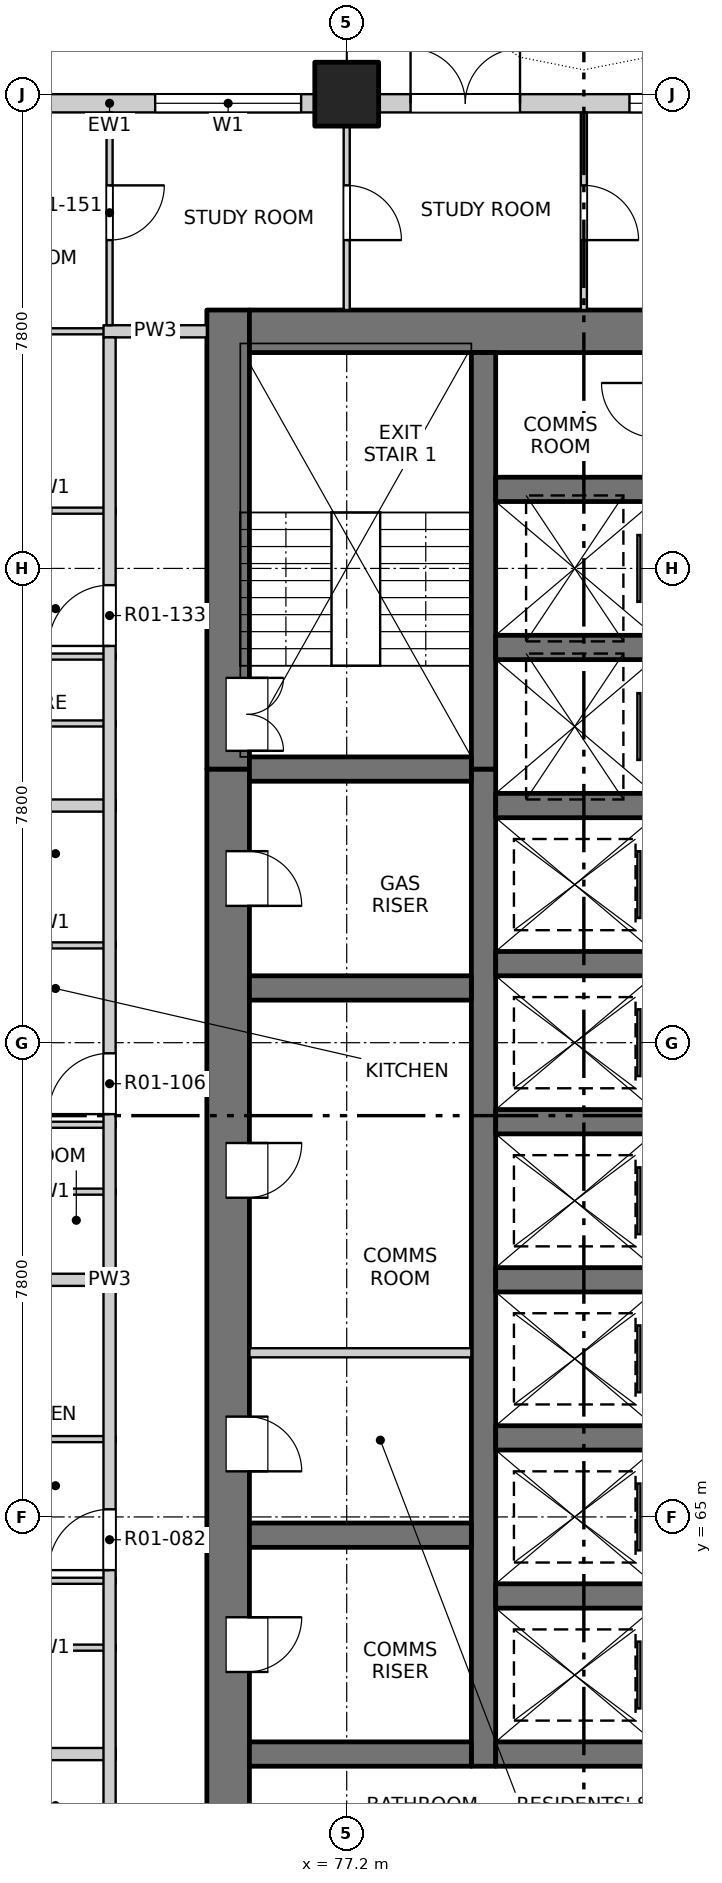
"""IFC4 building model, lengths in metres.
Left out: names, types, materials, properties, quantities, classifications, styles, units other than length and angle.
Written with IfcOpenShell. Run it as: python <this file> out.ifc"""

import sys

from ifc_helpers import new_model, si_unit, direction, frame, frame_2d, origin, origin_2d, place, context, subcontext, project, spatial, rectangle, extrude, element, fill, save


model = new_model("IFC4")
c1 = context("Model", 3, precision=1e-05, world=origin(), true_north=direction((0.0, 1.0)))
c2 = subcontext(c1, "Body", "Model", "MODEL_VIEW")
j1 = project(units=[si_unit("LENGTHUNIT", "METRE"), si_unit("PLANEANGLEUNIT", "RADIAN")], contexts=[c1])
p1 = place(None, origin())
s1 = spatial("IfcSite", under=j1, at=p1, CompositionType="ELEMENT")
p2 = place(p1, origin())
s2 = spatial("IfcBuilding", under=s1, at=p2, CompositionType="ELEMENT")
p3 = place(p2, frame((0.0, 0.0, 26.3)))
s3 = spatial("IfcBuildingStorey", under=s2, at=p3, CompositionType="ELEMENT", Elevation=26.3)
p4 = place(p3, frame((77.2, 88.4, -0.25), z_axis=(0.0, 0.0, 1.0), x_axis=(1.0, 0.0, 0.0)))
e1 = element("IfcColumn", 1, at=p4, inside=s3, PredefinedType="COLUMN", context=c2, shape_type="SweptSolid", body=[
    extrude(rectangle(XDim=1.05, YDim=1.05, at=origin_2d()), origin(), (0.0, 0.0, 1.0), 3.4),
])
p5 = place(p3, frame((75.25, 54.9, -0.25), z_axis=(0.0, 0.0, 1.0), x_axis=(0.0, 1.0, 0.0)))
e2 = element("IfcWall", 2, at=p5, inside=s3, PredefinedType="SOLIDWALL", context=c2, shape_type="SweptSolid", body=[
    extrude(rectangle(XDim=22.4, YDim=0.7, at=frame_2d((11.2, 0.0))), origin(), (0.0, 0.0, 1.0), 3.4),
])
p6 = place(p5, frame((7.55, 0.0, 0.25)))
e3 = element("IfcOpeningElement", 3, at=p6, cuts=e2, PredefinedType="OPENING", context=c2, shape_type="SweptSolid", body=[
    extrude(rectangle(XDim=0.9, YDim=2.1, at=frame_2d((0.45, 1.05))), frame((0.0, 0.36, 0.0), z_axis=(0.0, -1.0, 0.0), x_axis=(1.0, 0.0, 0.0)), (0.0, 0.0, 1.0), 0.72),
])
p7 = place(p5, frame((10.85, 0.0, 0.25)))
e4 = element("IfcOpeningElement", 4, at=p7, cuts=e2, PredefinedType="OPENING", context=c2, shape_type="SweptSolid", body=[
    extrude(rectangle(XDim=0.9, YDim=2.1, at=frame_2d((0.45, 1.05))), frame((0.0, 0.36, 0.0), z_axis=(0.0, -1.0, 0.0), x_axis=(1.0, 0.0, 0.0)), (0.0, 0.0, 1.0), 0.72),
])
p8 = place(p5, frame((15.35, 0.0, 0.25)))
e5 = element("IfcOpeningElement", 5, at=p8, cuts=e2, PredefinedType="OPENING", context=c2, shape_type="SweptSolid", body=[
    extrude(rectangle(XDim=0.9, YDim=2.1, at=frame_2d((0.45, 1.05))), frame((0.0, 0.36, 0.0), z_axis=(0.0, -1.0, 0.0), x_axis=(1.0, 0.0, 0.0)), (0.0, 0.0, 1.0), 0.72),
])
p9 = place(p5, frame((20.15, 0.0, 0.25)))
e6 = element("IfcOpeningElement", 6, at=p9, cuts=e2, PredefinedType="OPENING", context=c2, shape_type="SweptSolid", body=[
    extrude(rectangle(XDim=0.9, YDim=2.1, at=frame_2d((0.45, 1.05))), frame((0.0, 0.36, 0.0), z_axis=(0.0, -1.0, 0.0), x_axis=(1.0, 0.0, 0.0)), (0.0, 0.0, 1.0), 0.72),
])
p10 = place(p3, frame((75.25, 77.3, -0.25), z_axis=(0.0, 0.0, 1.0), x_axis=(0.0, 1.0, 0.0)))
e7 = element("IfcWall", 7, at=p10, inside=s3, PredefinedType="SOLIDWALL", context=c2, shape_type="SweptSolid", body=[
    extrude(rectangle(XDim=7.55, YDim=0.7, at=frame_2d((3.775, 0.0))), origin(), (0.0, 0.0, 1.0), 3.4),
])
p11 = place(p10, frame((0.3, 0.0, 0.25)))
e8 = element("IfcOpeningElement", 8, at=p11, cuts=e7, PredefinedType="OPENING", context=c2, shape_type="SweptSolid", body=[
    extrude(rectangle(XDim=1.2, YDim=2.1, at=frame_2d((0.6, 1.05))), frame((0.0, 0.36, 0.0), z_axis=(0.0, -1.0, 0.0), x_axis=(1.0, 0.0, 0.0)), (0.0, 0.0, 1.0), 0.72),
])
p12 = place(p3, frame((75.6, 84.5, -0.25), z_axis=(0.0, 0.0, 1.0), x_axis=(1.0, 0.0, 0.0)))
e9 = element("IfcWall", 9, at=p12, inside=s3, PredefinedType="SOLIDWALL", context=c2, shape_type="SweptSolid", body=[
    extrude(rectangle(XDim=18.8, YDim=0.7, at=frame_2d((9.4, 0.0))), origin(), (0.0, 0.0, 1.0), 3.4),
])
p13 = place(p3, frame((79.45, 60.9, -0.25), z_axis=(0.0, 0.0, 1.0), x_axis=(0.0, 1.0, 0.0)))
e10 = element("IfcWall", 10, at=p13, inside=s3, PredefinedType="SOLIDWALL", context=c2, shape_type="SweptSolid", body=[
    extrude(rectangle(XDim=16.4, YDim=0.4, at=frame_2d((8.2, 0.0))), origin(), (0.0, 0.0, 1.0), 3.4),
])
p14 = place(p3, frame((79.45, 77.3, -0.25), z_axis=(0.0, 0.0, 1.0), x_axis=(0.0, 1.0, 0.0)))
e11 = element("IfcWall", 11, at=p14, inside=s3, PredefinedType="SOLIDWALL", context=c2, shape_type="SweptSolid", body=[
    extrude(rectangle(XDim=6.85, YDim=0.4, at=frame_2d((3.425, 0.0))), origin(), (0.0, 0.0, 1.0), 3.4),
])
for number, where, z_axis, x_axis in (
    (12, (79.65, 61.1, -0.25), (0.0, 0.0, 1.0), (1.0, 0.0, 0.0)),
    (13, (79.65, 63.7, -0.25), (0.0, 0.0, 1.0), (1.0, 0.0, 0.0)),
    (14, (79.65, 66.3, -0.25), (0.0, 0.0, 1.0), (1.0, 0.0, 0.0)),
    (15, (79.65, 68.9, -0.25), (0.0, 0.0, 1.0), (1.0, 0.0, 0.0)),
    (16, (79.65, 71.5, -0.25), (0.0, 0.0, 1.0), (1.0, 0.0, 0.0)),
    (17, (79.65, 74.1, -0.25), (0.0, 0.0, 1.0), (1.0, 0.0, 0.0)),
    (18, (79.65, 76.7, -0.25), (0.0, 0.0, 1.0), (1.0, 0.0, 0.0)),
    (19, (79.65, 79.3, -0.25), (0.0, 0.0, 1.0), (1.0, 0.0, 0.0)),
    (20, (79.65, 81.9, -0.25), (0.0, 0.0, 1.0), (1.0, 0.0, 0.0)),
):
    element("IfcWall", number, at=place(p3, frame(where, z_axis=z_axis, x_axis=x_axis)), inside=s3, PredefinedType="SOLIDWALL", context=c2, shape_type="SweptSolid", body=[
        extrude(rectangle(XDim=3.0, YDim=0.4, at=frame_2d((1.5, 0.0))), origin(), (0.0, 0.0, 1.0), 3.4),
    ])
for number, where, z_axis, x_axis in (
    (21, (75.6, 61.1, -0.25), (0.0, 0.0, 1.0), (1.0, 0.0, 0.0)),
    (22, (75.6, 64.7, -0.25), (0.0, 0.0, 1.0), (1.0, 0.0, 0.0)),
    (23, (75.6, 73.7, -0.25), (0.0, 0.0, 1.0), (1.0, 0.0, 0.0)),
    (24, (75.6, 77.3, -0.25), (0.0, 0.0, 1.0), (1.0, 0.0, 0.0)),
):
    element("IfcWall", number, at=place(p3, frame(where, z_axis=z_axis, x_axis=x_axis)), inside=s3, PredefinedType="SOLIDWALL", context=c2, shape_type="SweptSolid", body=[
        extrude(rectangle(XDim=3.65, YDim=0.4, at=frame_2d((1.825, 0.0))), origin(), (0.0, 0.0, 1.0), 3.4),
    ])
p15 = place(p3, frame((69.925, 88.25, 0.0), z_axis=(0.0, 0.0, 1.0), x_axis=(1.0, 0.0, 0.0)))
e25 = element("IfcWall", 25, at=p15, inside=s3, PredefinedType="SOLIDWALL", context=c2, shape_type="SweptSolid", body=[
    extrude(rectangle(XDim=6.75, YDim=0.3, at=frame_2d((3.375, 0.0))), origin(), (0.0, 0.0, 1.0), 2.7),
])
p16 = place(p15, frame((0.525, 0.0, 0.0)))
e26 = element("IfcOpeningElement", 26, at=p16, cuts=e25, PredefinedType="OPENING", context=c2, shape_type="SweptSolid", body=[
    extrude(rectangle(XDim=1.8, YDim=2.4, at=frame_2d((0.9, 1.2))), frame((0.0, 0.16, 0.0), z_axis=(0.0, -1.0, 0.0), x_axis=(1.0, 0.0, 0.0)), (0.0, 0.0, 1.0), 0.32),
])
p17 = place(p15, frame((4.125, 0.0, 0.9)))
e27 = element("IfcOpeningElement", 27, at=p17, cuts=e25, PredefinedType="OPENING", context=c2, shape_type="SweptSolid", body=[
    extrude(rectangle(XDim=2.4, YDim=1.8, at=frame_2d((1.2, 0.9))), frame((0.0, 0.16, 0.0), z_axis=(0.0, -1.0, 0.0), x_axis=(1.0, 0.0, 0.0)), (0.0, 0.0, 1.0), 0.32),
])
p18 = place(p3, frame((77.725, 88.25, 0.0), z_axis=(0.0, 0.0, 1.0), x_axis=(1.0, 0.0, 0.0)))
e28 = element("IfcWall", 28, at=p18, inside=s3, PredefinedType="SOLIDWALL", context=c2, shape_type="SweptSolid", body=[
    extrude(rectangle(XDim=6.75, YDim=0.3, at=frame_2d((3.375, 0.0))), origin(), (0.0, 0.0, 1.0), 2.7),
])
p19 = place(p18, frame((0.525, 0.0, 0.0)))
e29 = element("IfcOpeningElement", 29, at=p19, cuts=e28, PredefinedType="OPENING", context=c2, shape_type="SweptSolid", body=[
    extrude(rectangle(XDim=1.8, YDim=2.4, at=frame_2d((0.9, 1.2))), frame((0.0, 0.16, 0.0), z_axis=(0.0, -1.0, 0.0), x_axis=(1.0, 0.0, 0.0)), (0.0, 0.0, 1.0), 0.32),
])
p20 = place(p18, frame((4.125, 0.0, 0.9)))
e30 = element("IfcOpeningElement", 30, at=p20, cuts=e28, PredefinedType="OPENING", context=c2, shape_type="SweptSolid", body=[
    extrude(rectangle(XDim=2.4, YDim=1.8, at=frame_2d((1.2, 0.9))), frame((0.0, 0.16, 0.0), z_axis=(0.0, -1.0, 0.0), x_axis=(1.0, 0.0, 0.0)), (0.0, 0.0, 1.0), 0.32),
])
p21 = place(p3, frame((61.9, 61.1, 0.0), z_axis=(0.0, 0.0, 1.0), x_axis=(1.0, 0.0, 0.0)))
e31 = element("IfcWall", 31, at=p21, inside=s3, PredefinedType="PARTITIONING", context=c2, shape_type="SweptSolid", body=[
    extrude(rectangle(XDim=11.5, YDim=0.2, at=frame_2d((5.75, 0.0))), origin(), (0.0, 0.0, 1.0), 3.15),
])
for number, where, z_axis, x_axis in (
    (32, (71.18, 62.85, 0.0), (0.0, 0.0, 1.0), (1.0, 0.0, 0.0)),
    (33, (71.18, 63.95, 0.0), (0.0, 0.0, 1.0), (1.0, 0.0, 0.0)),
    (34, (71.18, 66.28, 0.0), (0.0, 0.0, 1.0), (1.0, 0.0, 0.0)),
):
    element("IfcWall", number, at=place(p3, frame(where, z_axis=z_axis, x_axis=x_axis)), inside=s3, PredefinedType="PARTITIONING", context=c2, shape_type="SweptSolid", body=[
        extrude(rectangle(XDim=2.22, YDim=0.1, at=frame_2d((1.11, 0.0))), origin(), (0.0, 0.0, 1.0), 3.15),
    ])
p22 = place(p3, frame((75.6, 67.7, 0.0), z_axis=(0.0, 0.0, 1.0), x_axis=(1.0, 0.0, 0.0)))
e35 = element("IfcWall", 35, at=p22, inside=s3, PredefinedType="PARTITIONING", context=c2, shape_type="SweptSolid", body=[
    extrude(rectangle(XDim=3.65, YDim=0.15, at=frame_2d((1.825, 0.0))), origin(), (0.0, 0.0, 1.0), 3.15),
])
p23 = place(p3, frame((61.9, 68.9, 0.0), z_axis=(0.0, 0.0, 1.0), x_axis=(1.0, 0.0, 0.0)))
e36 = element("IfcWall", 36, at=p23, inside=s3, PredefinedType="PARTITIONING", context=c2, shape_type="SweptSolid", body=[
    extrude(rectangle(XDim=11.5, YDim=0.2, at=frame_2d((5.75, 0.0))), origin(), (0.0, 0.0, 1.0), 3.15),
])
for number, where, z_axis, x_axis in (
    (37, (71.18, 70.35, 0.0), (0.0, 0.0, 1.0), (1.0, 0.0, 0.0)),
    (38, (71.18, 71.45, 0.0), (0.0, 0.0, 1.0), (1.0, 0.0, 0.0)),
    (39, (71.18, 74.4, 0.0), (0.0, 0.0, 1.0), (1.0, 0.0, 0.0)),
):
    element("IfcWall", number, at=place(p3, frame(where, z_axis=z_axis, x_axis=x_axis)), inside=s3, PredefinedType="PARTITIONING", context=c2, shape_type="SweptSolid", body=[
        extrude(rectangle(XDim=2.22, YDim=0.1, at=frame_2d((1.11, 0.0))), origin(), (0.0, 0.0, 1.0), 3.15),
    ])
p24 = place(p3, frame((61.9, 76.7, 0.0), z_axis=(0.0, 0.0, 1.0), x_axis=(1.0, 0.0, 0.0)))
e40 = element("IfcWall", 40, at=p24, inside=s3, PredefinedType="PARTITIONING", context=c2, shape_type="SweptSolid", body=[
    extrude(rectangle(XDim=11.5, YDim=0.2, at=frame_2d((5.75, 0.0))), origin(), (0.0, 0.0, 1.0), 3.15),
])
for number, where, z_axis, x_axis in (
    (41, (71.18, 78.05, 0.0), (0.0, 0.0, 1.0), (1.0, 0.0, 0.0)),
    (42, (71.18, 79.15, 0.0), (0.0, 0.0, 1.0), (1.0, 0.0, 0.0)),
    (43, (71.18, 81.55, 0.0), (0.0, 0.0, 1.0), (1.0, 0.0, 0.0)),
):
    element("IfcWall", number, at=place(p3, frame(where, z_axis=z_axis, x_axis=x_axis)), inside=s3, PredefinedType="PARTITIONING", context=c2, shape_type="SweptSolid", body=[
        extrude(rectangle(XDim=2.22, YDim=0.1, at=frame_2d((1.11, 0.0))), origin(), (0.0, 0.0, 1.0), 3.15),
    ])
p25 = place(p3, frame((61.9, 84.5, 0.0), z_axis=(0.0, 0.0, 1.0), x_axis=(1.0, 0.0, 0.0)))
e44 = element("IfcWall", 44, at=p25, inside=s3, PredefinedType="PARTITIONING", context=c2, shape_type="SweptSolid", body=[
    extrude(rectangle(XDim=11.5, YDim=0.1, at=frame_2d((5.75, 0.0))), origin(), (0.0, 0.0, 1.0), 3.15),
])
p26 = place(p25, frame((7.965, 0.0, 0.0)))
e45 = element("IfcOpeningElement", 45, at=p26, cuts=e44, PredefinedType="OPENING", context=c2, shape_type="SweptSolid", body=[
    extrude(rectangle(XDim=0.9, YDim=2.1, at=frame_2d((0.45, 1.05))), frame((0.0, 0.06, 0.0), z_axis=(0.0, -1.0, 0.0), x_axis=(1.0, 0.0, 0.0)), (0.0, 0.0, 1.0), 0.12),
])
p27 = place(p3, frame((73.2, 84.5, 0.0), z_axis=(0.0, 0.0, 1.0), x_axis=(1.0, 0.0, 0.0)))
e46 = element("IfcWall", 46, at=p27, inside=s3, PredefinedType="PARTITIONING", context=c2, shape_type="SweptSolid", body=[
    extrude(rectangle(XDim=1.7, YDim=0.2, at=frame_2d((0.85, 0.0))), origin(), (0.0, 0.0, 1.0), 3.15),
])
p28 = place(p3, frame((73.3, 53.4, 0.0), z_axis=(0.0, 0.0, 1.0), x_axis=(0.0, 1.0, 0.0)))
e47 = element("IfcWall", 47, at=p28, inside=s3, PredefinedType="PARTITIONING", context=c2, shape_type="SweptSolid", body=[
    extrude(rectangle(XDim=31.0, YDim=0.2, at=frame_2d((15.5, 0.0))), origin(), (0.0, 0.0, 1.0), 3.15),
])
p29 = place(p28, frame((2.325, 0.0, 0.0)))
e48 = element("IfcOpeningElement", 48, at=p29, cuts=e47, PredefinedType="OPENING", context=c2, shape_type="SweptSolid", body=[
    extrude(rectangle(XDim=1.0, YDim=2.1, at=frame_2d((0.5, 1.05))), frame((0.0, 0.11, 0.0), z_axis=(0.0, -1.0, 0.0), x_axis=(1.0, 0.0, 0.0)), (0.0, 0.0, 1.0), 0.22),
])
p30 = place(p28, frame((10.725, 0.0, 0.0)))
e49 = element("IfcOpeningElement", 49, at=p30, cuts=e47, PredefinedType="OPENING", context=c2, shape_type="SweptSolid", body=[
    extrude(rectangle(XDim=1.0, YDim=2.1, at=frame_2d((0.5, 1.05))), frame((0.0, 0.11, 0.0), z_axis=(0.0, -1.0, 0.0), x_axis=(1.0, 0.0, 0.0)), (0.0, 0.0, 1.0), 0.22),
])
p31 = place(p28, frame((18.225, 0.0, 0.0)))
e50 = element("IfcOpeningElement", 50, at=p31, cuts=e47, PredefinedType="OPENING", context=c2, shape_type="SweptSolid", body=[
    extrude(rectangle(XDim=1.0, YDim=2.1, at=frame_2d((0.5, 1.05))), frame((0.0, 0.11, 0.0), z_axis=(0.0, -1.0, 0.0), x_axis=(1.0, 0.0, 0.0)), (0.0, 0.0, 1.0), 0.22),
])
p32 = place(p28, frame((25.925, 0.0, 0.0)))
e51 = element("IfcOpeningElement", 51, at=p32, cuts=e47, PredefinedType="OPENING", context=c2, shape_type="SweptSolid", body=[
    extrude(rectangle(XDim=1.0, YDim=2.1, at=frame_2d((0.5, 1.05))), frame((0.0, 0.11, 0.0), z_axis=(0.0, -1.0, 0.0), x_axis=(1.0, 0.0, 0.0)), (0.0, 0.0, 1.0), 0.22),
])
p33 = place(p3, frame((73.3, 84.6, 0.0), z_axis=(0.0, 0.0, 1.0), x_axis=(0.0, 1.0, 0.0)))
e52 = element("IfcWall", 52, at=p33, inside=s3, PredefinedType="PARTITIONING", context=c2, shape_type="SweptSolid", body=[
    extrude(rectangle(XDim=3.5, YDim=0.1, at=frame_2d((1.75, 0.0))), origin(), (0.0, 0.0, 1.0), 3.15),
])
p34 = place(p33, frame((1.4, 0.0, 0.0)))
e53 = element("IfcOpeningElement", 53, at=p34, cuts=e52, PredefinedType="OPENING", context=c2, shape_type="SweptSolid", body=[
    extrude(rectangle(XDim=0.9, YDim=2.1, at=frame_2d((0.45, 1.05))), frame((0.0, 0.06, 0.0), z_axis=(0.0, -1.0, 0.0), x_axis=(1.0, 0.0, 0.0)), (0.0, 0.0, 1.0), 0.12),
])
p35 = place(p3, frame((77.2, 84.85, 0.0), z_axis=(0.0, 0.0, 1.0), x_axis=(0.0, 1.0, 0.0)))
e54 = element("IfcWall", 54, at=p35, inside=s3, PredefinedType="PARTITIONING", context=c2, shape_type="SweptSolid", body=[
    extrude(rectangle(XDim=3.25, YDim=0.1, at=frame_2d((1.625, 0.0))), origin(), (0.0, 0.0, 1.0), 3.15),
])
p36 = place(p35, frame((1.15, 0.0, 0.0)))
e55 = element("IfcOpeningElement", 55, at=p36, cuts=e54, PredefinedType="OPENING", context=c2, shape_type="SweptSolid", body=[
    extrude(rectangle(XDim=0.9, YDim=2.1, at=frame_2d((0.45, 1.05))), frame((0.0, 0.06, 0.0), z_axis=(0.0, -1.0, 0.0), x_axis=(1.0, 0.0, 0.0)), (0.0, 0.0, 1.0), 0.12),
])
p37 = place(p3, frame((81.1, 84.85, 0.0), z_axis=(0.0, 0.0, 1.0), x_axis=(0.0, 1.0, 0.0)))
e56 = element("IfcWall", 56, at=p37, inside=s3, PredefinedType="PARTITIONING", context=c2, shape_type="SweptSolid", body=[
    extrude(rectangle(XDim=3.25, YDim=0.1, at=frame_2d((1.625, 0.0))), origin(), (0.0, 0.0, 1.0), 3.15),
])
p38 = place(p37, frame((1.15, 0.0, 0.0)))
e57 = element("IfcOpeningElement", 57, at=p38, cuts=e56, PredefinedType="OPENING", context=c2, shape_type="SweptSolid", body=[
    extrude(rectangle(XDim=0.9, YDim=2.1, at=frame_2d((0.45, 1.05))), frame((0.0, 0.06, 0.0), z_axis=(0.0, -1.0, 0.0), x_axis=(1.0, 0.0, 0.0)), (0.0, 0.0, 1.0), 0.12),
])
p39 = place(p17, origin())
e58 = element("IfcWindow", 58, at=p39, inside=s3, PartitioningType="DOUBLE_PANEL_VERTICAL", PredefinedType="WINDOW", context=c2, shape_type="SweptSolid", body=[
    extrude(rectangle(XDim=2.4, YDim=1.8, at=frame_2d((1.2, 0.9))), frame((0.0, 0.03, 0.0), z_axis=(0.0, -1.0, 0.0), x_axis=(1.0, 0.0, 0.0)), (0.0, 0.0, 1.0), 0.06),
])
fill(e27, e58)
p40 = place(p19, origin())
e59 = element("IfcDoor", 59, at=p40, inside=s3, OperationType="DOUBLE_DOOR_SINGLE_SWING", PredefinedType="DOOR", context=c2, shape_type="SweptSolid", body=[
    extrude(rectangle(XDim=1.8, YDim=2.4, at=frame_2d((0.9, 1.2))), frame((0.0, 0.025, 0.0), z_axis=(0.0, -1.0, 0.0), x_axis=(1.0, 0.0, 0.0)), (0.0, 0.0, 1.0), 0.05),
])
fill(e29, e59)
p41 = place(p20, origin())
e60 = element("IfcWindow", 60, at=p41, inside=s3, PartitioningType="DOUBLE_PANEL_VERTICAL", PredefinedType="WINDOW", context=c2, shape_type="SweptSolid", body=[
    extrude(rectangle(XDim=2.4, YDim=1.8, at=frame_2d((1.2, 0.9))), frame((0.0, 0.03, 0.0), z_axis=(0.0, -1.0, 0.0), x_axis=(1.0, 0.0, 0.0)), (0.0, 0.0, 1.0), 0.06),
])
fill(e30, e60)
p42 = place(p6, origin())
e61 = element("IfcDoor", 61, at=p42, inside=s3, OperationType="SINGLE_SWING_LEFT", PredefinedType="DOOR", context=c2, shape_type="SweptSolid", body=[
    extrude(rectangle(XDim=0.9, YDim=2.1, at=frame_2d((0.45, 1.05))), frame((0.0, -0.285, 0.0), z_axis=(0.0, -1.0, 0.0), x_axis=(1.0, 0.0, 0.0)), (0.0, 0.0, 1.0), 0.05),
])
fill(e3, e61)
p43 = place(p30, origin())
e62 = element("IfcDoor", 62, at=p43, inside=s3, OperationType="SINGLE_SWING_RIGHT", PredefinedType="DOOR", context=c2, shape_type="SweptSolid", body=[
    extrude(rectangle(XDim=1.0, YDim=2.1, at=frame_2d((0.5, 1.05))), frame((0.0, 0.025, 0.0), z_axis=(0.0, -1.0, 0.0), x_axis=(1.0, 0.0, 0.0)), (0.0, 0.0, 1.0), 0.05),
])
fill(e49, e62)
p44 = place(p7, origin())
e63 = element("IfcDoor", 63, at=p44, inside=s3, OperationType="SINGLE_SWING_RIGHT", PredefinedType="DOOR", context=c2, shape_type="SweptSolid", body=[
    extrude(rectangle(XDim=0.9, YDim=2.1, at=frame_2d((0.45, 1.05))), frame((0.0, -0.285, 0.0), z_axis=(0.0, -1.0, 0.0), x_axis=(1.0, 0.0, 0.0)), (0.0, 0.0, 1.0), 0.05),
])
fill(e4, e63)
p45 = place(p8, origin())
e64 = element("IfcDoor", 64, at=p45, inside=s3, OperationType="SINGLE_SWING_LEFT", PredefinedType="DOOR", context=c2, shape_type="SweptSolid", body=[
    extrude(rectangle(XDim=0.9, YDim=2.1, at=frame_2d((0.45, 1.05))), frame((0.0, -0.285, 0.0), z_axis=(0.0, -1.0, 0.0), x_axis=(1.0, 0.0, 0.0)), (0.0, 0.0, 1.0), 0.05),
])
fill(e5, e64)
p46 = place(p31, origin())
e65 = element("IfcDoor", 65, at=p46, inside=s3, OperationType="SINGLE_SWING_RIGHT", PredefinedType="DOOR", context=c2, shape_type="SweptSolid", body=[
    extrude(rectangle(XDim=1.0, YDim=2.1, at=frame_2d((0.5, 1.05))), frame((0.0, 0.025, 0.0), z_axis=(0.0, -1.0, 0.0), x_axis=(1.0, 0.0, 0.0)), (0.0, 0.0, 1.0), 0.05),
])
fill(e50, e65)
p47 = place(p9, origin())
e66 = element("IfcDoor", 66, at=p47, inside=s3, OperationType="SINGLE_SWING_RIGHT", PredefinedType="DOOR", context=c2, shape_type="SweptSolid", body=[
    extrude(rectangle(XDim=0.9, YDim=2.1, at=frame_2d((0.45, 1.05))), frame((0.0, -0.285, 0.0), z_axis=(0.0, -1.0, 0.0), x_axis=(1.0, 0.0, 0.0)), (0.0, 0.0, 1.0), 0.05),
])
fill(e6, e66)
p48 = place(p11, origin())
e67 = element("IfcDoor", 67, at=p48, inside=s3, OperationType="DOUBLE_DOOR_SINGLE_SWING", PredefinedType="DOOR", context=c2, shape_type="SweptSolid", body=[
    extrude(rectangle(XDim=1.2, YDim=2.1, at=frame_2d((0.6, 1.05))), frame((0.0, -0.285, 0.0), z_axis=(0.0, -1.0, 0.0), x_axis=(1.0, 0.0, 0.0)), (0.0, 0.0, 1.0), 0.05),
])
fill(e8, e67)
p49 = place(p32, origin())
e68 = element("IfcDoor", 68, at=p49, inside=s3, OperationType="SINGLE_SWING_RIGHT", PredefinedType="DOOR", context=c2, shape_type="SweptSolid", body=[
    extrude(rectangle(XDim=1.0, YDim=2.1, at=frame_2d((0.5, 1.05))), frame((0.0, 0.025, 0.0), z_axis=(0.0, -1.0, 0.0), x_axis=(1.0, 0.0, 0.0)), (0.0, 0.0, 1.0), 0.05),
])
fill(e51, e68)
p50 = place(p34, origin())
e69 = element("IfcDoor", 69, at=p50, inside=s3, OperationType="SINGLE_SWING_LEFT", PredefinedType="DOOR", context=c2, shape_type="SweptSolid", body=[
    extrude(rectangle(XDim=0.9, YDim=2.1, at=frame_2d((0.45, 1.05))), frame((0.0, 0.025, 0.0), z_axis=(0.0, -1.0, 0.0), x_axis=(1.0, 0.0, 0.0)), (0.0, 0.0, 1.0), 0.05),
])
fill(e53, e69)
p51 = place(p36, origin())
e70 = element("IfcDoor", 70, at=p51, inside=s3, OperationType="SINGLE_SWING_RIGHT", PredefinedType="DOOR", context=c2, shape_type="SweptSolid", body=[
    extrude(rectangle(XDim=0.9, YDim=2.1, at=frame_2d((0.45, 1.05))), frame((0.0, 0.025, 0.0), z_axis=(0.0, -1.0, 0.0), x_axis=(1.0, 0.0, 0.0)), (0.0, 0.0, 1.0), 0.05),
])
fill(e55, e70)
p52 = place(p38, origin())
e71 = element("IfcDoor", 71, at=p52, inside=s3, OperationType="SINGLE_SWING_RIGHT", PredefinedType="DOOR", context=c2, shape_type="SweptSolid", body=[
    extrude(rectangle(XDim=0.9, YDim=2.1, at=frame_2d((0.45, 1.05))), frame((0.0, 0.025, 0.0), z_axis=(0.0, -1.0, 0.0), x_axis=(1.0, 0.0, 0.0)), (0.0, 0.0, 1.0), 0.05),
])
fill(e57, e71)
save(model, sys.argv[1])
